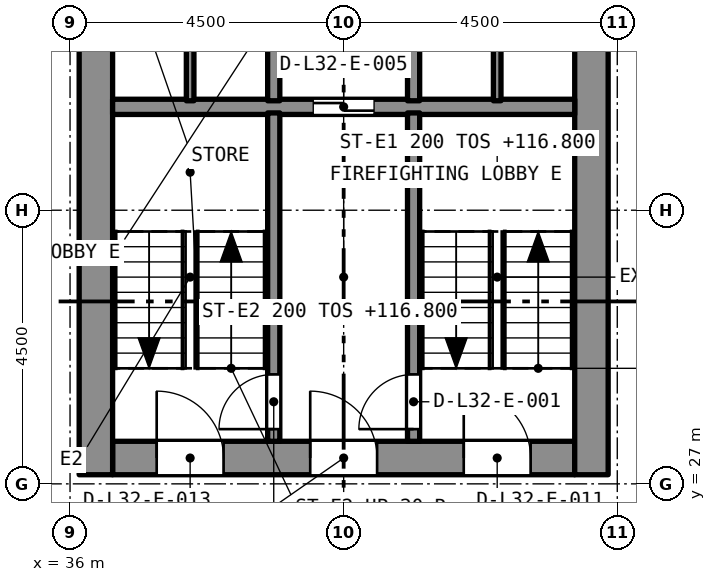
"""IFC4 building model, lengths in metres.
Left out: names, types, materials, properties, quantities, classifications, styles, units other than length and angle.
Written with IfcOpenShell. Run it as: python <this file> out.ifc"""

import sys

from ifc_helpers import new_model, si_unit, direction, frame, frame_2d, origin, place, context, subcontext, project, spatial, rectangle, extrude, element, fill, save


model = new_model("IFC4")
c1 = context("Model", 3, precision=1e-05, world=origin(), true_north=direction((0.0, 1.0)))
c2 = subcontext(c1, "Body", "Model", "MODEL_VIEW")
j1 = project(units=[si_unit("LENGTHUNIT", "METRE"), si_unit("PLANEANGLEUNIT", "RADIAN")], contexts=[c1])
p1 = place(None, origin())
s1 = spatial("IfcSite", under=j1, at=p1, CompositionType="ELEMENT")
p2 = place(p1, origin())
s2 = spatial("IfcBuilding", under=s1, at=p2, CompositionType="ELEMENT")
p3 = place(p2, frame((0.0, 0.0, 115.2)))
s3 = spatial("IfcBuildingStorey", under=s2, at=p3, CompositionType="ELEMENT", Elevation=115.2)
p4 = place(p3, frame((36.7, 27.425, 0.0), z_axis=(0.0, 0.0, 1.0), x_axis=(1.0, 0.0, 0.0)))
e1 = element("IfcWall", 1, at=p4, inside=s3, PredefinedType="SOLIDWALL", context=c2, shape_type="SweptSolid", body=[
    extrude(rectangle(XDim=7.6, YDim=0.55, at=frame_2d((3.8, 0.0))), origin(), (0.0, 0.0, 1.0), 3.2),
])
p5 = place(p4, frame((5.775, 0.0, 0.0)))
e2 = element("IfcOpeningElement", 2, at=p5, cuts=e1, PredefinedType="OPENING", context=c2, shape_type="SweptSolid", body=[
    extrude(rectangle(XDim=1.1, YDim=2.1, at=frame_2d((0.55, 1.05))), frame((0.0, 0.285, 0.0), z_axis=(0.0, -1.0, 0.0), x_axis=(1.0, 0.0, 0.0)), (0.0, 0.0, 1.0), 0.57),
])
p6 = place(p4, frame((3.25, 0.0, 0.0)))
e3 = element("IfcOpeningElement", 3, at=p6, cuts=e1, PredefinedType="OPENING", context=c2, shape_type="SweptSolid", body=[
    extrude(rectangle(XDim=1.1, YDim=2.1, at=frame_2d((0.55, 1.05))), frame((0.0, 0.285, 0.0), z_axis=(0.0, -1.0, 0.0), x_axis=(1.0, 0.0, 0.0)), (0.0, 0.0, 1.0), 0.57),
])
p7 = place(p4, frame((0.725, 0.0, 0.0)))
e4 = element("IfcOpeningElement", 4, at=p7, cuts=e1, PredefinedType="OPENING", context=c2, shape_type="SweptSolid", body=[
    extrude(rectangle(XDim=1.1, YDim=2.1, at=frame_2d((0.55, 1.05))), frame((0.0, 0.285, 0.0), z_axis=(0.0, -1.0, 0.0), x_axis=(1.0, 0.0, 0.0)), (0.0, 0.0, 1.0), 0.57),
])
p8 = place(p3, frame((36.425, 27.15, 0.0), z_axis=(0.0, 0.0, 1.0), x_axis=(0.0, 1.0, 0.0)))
e5 = element("IfcWall", 5, at=p8, inside=s3, PredefinedType="SOLIDWALL", context=c2, shape_type="SweptSolid", body=[
    extrude(rectangle(XDim=13.2, YDim=0.55, at=frame_2d((6.6, 0.0))), origin(), (0.0, 0.0, 1.0), 3.2),
])
p9 = place(p8, frame((8.8, 0.0, 0.0)))
e6 = element("IfcOpeningElement", 6, at=p9, cuts=e5, PredefinedType="OPENING", context=c2, shape_type="SweptSolid", body=[
    extrude(rectangle(XDim=1.2, YDim=2.1, at=frame_2d((0.6, 1.05))), frame((0.0, 0.285, 0.0), z_axis=(0.0, -1.0, 0.0), x_axis=(1.0, 0.0, 0.0)), (0.0, 0.0, 1.0), 0.57),
])
p10 = place(p3, frame((44.575, 27.15, 0.0), z_axis=(0.0, 0.0, 1.0), x_axis=(0.0, 1.0, 0.0)))
e7 = element("IfcWall", 7, at=p10, inside=s3, PredefinedType="SOLIDWALL", context=c2, shape_type="SweptSolid", body=[
    extrude(rectangle(XDim=13.2, YDim=0.55, at=frame_2d((6.6, 0.0))), origin(), (0.0, 0.0, 1.0), 3.2),
])
p11 = place(p10, frame((8.8, 0.0, 0.0)))
e8 = element("IfcOpeningElement", 8, at=p11, cuts=e7, PredefinedType="OPENING", context=c2, shape_type="SweptSolid", body=[
    extrude(rectangle(XDim=1.2, YDim=2.1, at=frame_2d((0.6, 1.05))), frame((0.0, 0.285, 0.0), z_axis=(0.0, -1.0, 0.0), x_axis=(1.0, 0.0, 0.0)), (0.0, 0.0, 1.0), 0.57),
])
p12 = place(p3, frame((36.7, 33.2, 0.0), z_axis=(0.0, 0.0, 1.0), x_axis=(1.0, 0.0, 0.0)))
e9 = element("IfcWall", 9, at=p12, inside=s3, PredefinedType="SOLIDWALL", context=c2, shape_type="SweptSolid", body=[
    extrude(rectangle(XDim=7.6, YDim=0.25, at=frame_2d((3.8, 0.0))), origin(), (0.0, 0.0, 1.0), 2.9),
])
p13 = place(p12, frame((3.3, 0.0, 0.0)))
e10 = element("IfcOpeningElement", 10, at=p13, cuts=e9, PredefinedType="OPENING", context=c2, shape_type="SweptSolid", body=[
    extrude(rectangle(XDim=1.0, YDim=2.1, at=frame_2d((0.5, 1.05))), frame((0.0, 0.135, 0.0), z_axis=(0.0, -1.0, 0.0), x_axis=(1.0, 0.0, 0.0)), (0.0, 0.0, 1.0), 0.27),
])
p14 = place(p3, frame((41.65, 27.7, 0.0), z_axis=(0.0, 0.0, 1.0), x_axis=(0.0, 1.0, 0.0)))
e11 = element("IfcWall", 11, at=p14, inside=s3, PredefinedType="SOLIDWALL", context=c2, shape_type="SweptSolid", body=[
    extrude(rectangle(XDim=5.4, YDim=0.2, at=frame_2d((2.7, 0.0))), origin(), (0.0, 0.0, 1.0), 2.9),
])
p15 = place(p14, frame((0.2, 0.0, 0.0)))
e12 = element("IfcOpeningElement", 12, at=p15, cuts=e11, PredefinedType="OPENING", context=c2, shape_type="SweptSolid", body=[
    extrude(rectangle(XDim=0.9, YDim=2.1, at=frame_2d((0.45, 1.05))), frame((0.0, 0.11, 0.0), z_axis=(0.0, -1.0, 0.0), x_axis=(1.0, 0.0, 0.0)), (0.0, 0.0, 1.0), 0.22),
])
p16 = place(p3, frame((39.35, 27.7, 0.0), z_axis=(0.0, 0.0, 1.0), x_axis=(0.0, 1.0, 0.0)))
e13 = element("IfcWall", 13, at=p16, inside=s3, PredefinedType="SOLIDWALL", context=c2, shape_type="SweptSolid", body=[
    extrude(rectangle(XDim=5.4, YDim=0.2, at=frame_2d((2.7, 0.0))), origin(), (0.0, 0.0, 1.0), 2.9),
])
p17 = place(p16, frame((0.2, 0.0, 0.0)))
e14 = element("IfcOpeningElement", 14, at=p17, cuts=e13, PredefinedType="OPENING", context=c2, shape_type="SweptSolid", body=[
    extrude(rectangle(XDim=0.9, YDim=2.1, at=frame_2d((0.45, 1.05))), frame((0.0, 0.11, 0.0), z_axis=(0.0, -1.0, 0.0), x_axis=(1.0, 0.0, 0.0)), (0.0, 0.0, 1.0), 0.22),
])
for number, where, z_axis, x_axis in (
    (15, (41.65, 33.3, 0.0), (0.0, 0.0, 1.0), (0.0, 1.0, 0.0)),
    (16, (39.35, 33.3, 0.0), (0.0, 0.0, 1.0), (0.0, 1.0, 0.0)),
):
    element("IfcWall", number, at=place(p3, frame(where, z_axis=z_axis, x_axis=x_axis)), inside=s3, PredefinedType="SOLIDWALL", context=c2, shape_type="SweptSolid", body=[
        extrude(rectangle(XDim=2.3, YDim=0.2, at=frame_2d((1.15, 0.0))), origin(), (0.0, 0.0, 1.0), 2.9),
    ])
for number, where, z_axis, x_axis in (
    (17, (43.025, 33.3, 0.0), (0.0, 0.0, 1.0), (0.0, 1.0, 0.0)),
    (18, (37.975, 33.3, 0.0), (0.0, 0.0, 1.0), (0.0, 1.0, 0.0)),
):
    element("IfcWall", number, at=place(p3, frame(where, z_axis=z_axis, x_axis=x_axis)), inside=s3, PredefinedType="PARTITIONING", context=c2, shape_type="SweptSolid", body=[
        extrude(rectangle(XDim=2.3, YDim=0.125, at=frame_2d((1.15, 0.0))), origin(), (0.0, 0.0, 1.0), 2.9),
    ])
p18 = place(p15, origin())
e19 = element("IfcDoor", 19, at=p18, inside=s3, OperationType="SINGLE_SWING_LEFT", PredefinedType="DOOR", context=c2, shape_type="SweptSolid", body=[
    extrude(rectangle(XDim=0.9, YDim=2.1, at=frame_2d((0.45, 1.05))), frame((0.0, 0.025, 0.0), z_axis=(0.0, -1.0, 0.0), x_axis=(1.0, 0.0, 0.0)), (0.0, 0.0, 1.0), 0.05),
])
fill(e12, e19)
p19 = place(p17, origin())
e20 = element("IfcDoor", 20, at=p19, inside=s3, OperationType="SINGLE_SWING_LEFT", PredefinedType="DOOR", context=c2, shape_type="SweptSolid", body=[
    extrude(rectangle(XDim=0.9, YDim=2.1, at=frame_2d((0.45, 1.05))), frame((0.0, 0.025, 0.0), z_axis=(0.0, -1.0, 0.0), x_axis=(1.0, 0.0, 0.0)), (0.0, 0.0, 1.0), 0.05),
])
fill(e14, e20)
p20 = place(p13, origin())
e21 = element("IfcDoor", 21, at=p20, inside=s3, OperationType="SLIDING_TO_LEFT", PredefinedType="DOOR", context=c2, shape_type="SweptSolid", body=[
    extrude(rectangle(XDim=1.0, YDim=2.1, at=frame_2d((0.5, 1.05))), frame((0.0, 0.025, 0.0), z_axis=(0.0, -1.0, 0.0), x_axis=(1.0, 0.0, 0.0)), (0.0, 0.0, 1.0), 0.05),
])
fill(e10, e21)
p21 = place(p5, origin())
e22 = element("IfcDoor", 22, at=p21, inside=s3, OperationType="SINGLE_SWING_LEFT", PredefinedType="DOOR", context=c2, shape_type="SweptSolid", body=[
    extrude(rectangle(XDim=1.1, YDim=2.1, at=frame_2d((0.55, 1.05))), frame((0.0, 0.025, 0.0), z_axis=(0.0, -1.0, 0.0), x_axis=(1.0, 0.0, 0.0)), (0.0, 0.0, 1.0), 0.05),
])
fill(e2, e22)
p22 = place(p6, origin())
e23 = element("IfcDoor", 23, at=p22, inside=s3, OperationType="SINGLE_SWING_LEFT", PredefinedType="DOOR", context=c2, shape_type="SweptSolid", body=[
    extrude(rectangle(XDim=1.1, YDim=2.1, at=frame_2d((0.55, 1.05))), frame((0.0, 0.025, 0.0), z_axis=(0.0, -1.0, 0.0), x_axis=(1.0, 0.0, 0.0)), (0.0, 0.0, 1.0), 0.05),
])
fill(e3, e23)
p23 = place(p7, origin())
e24 = element("IfcDoor", 24, at=p23, inside=s3, OperationType="SINGLE_SWING_LEFT", PredefinedType="DOOR", context=c2, shape_type="SweptSolid", body=[
    extrude(rectangle(XDim=1.1, YDim=2.1, at=frame_2d((0.55, 1.05))), frame((0.0, 0.025, 0.0), z_axis=(0.0, -1.0, 0.0), x_axis=(1.0, 0.0, 0.0)), (0.0, 0.0, 1.0), 0.05),
])
fill(e4, e24)
save(model, sys.argv[1])
